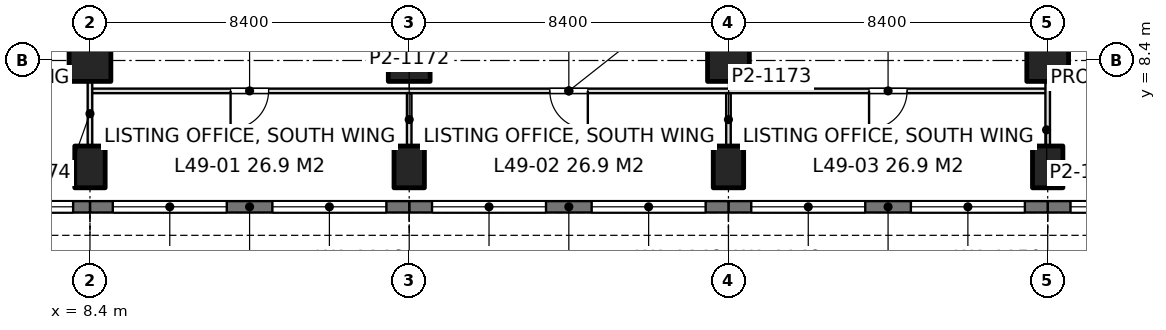
"""IFC4 building model, lengths in metres.
Left out: names, types, materials, properties, quantities, classifications, styles, units other than length and angle.
Written with IfcOpenShell. Run it as: python <this file> out.ifc"""

import sys

from ifc_helpers import new_model, si_unit, direction, frame, frame_2d, origin, origin_2d, place, context, subcontext, project, spatial, rectangle, extrude, element, fill, save


model = new_model("IFC4")
c1 = context("Model", 3, precision=1e-05, world=origin(), true_north=direction((0.0, 1.0)))
c2 = subcontext(c1, "Body", "Model", "MODEL_VIEW")
j1 = project(units=[si_unit("LENGTHUNIT", "METRE"), si_unit("PLANEANGLEUNIT", "RADIAN")], contexts=[c1])
p1 = place(None, origin())
s1 = spatial("IfcSite", under=j1, at=p1, CompositionType="ELEMENT")
p2 = place(p1, origin())
s2 = spatial("IfcBuilding", under=s1, at=p2, CompositionType="ELEMENT")
p3 = place(p2, frame((0.0, 0.0, 215.4)))
s3 = spatial("IfcBuildingStorey", under=s2, at=p3, CompositionType="ELEMENT", Elevation=215.4)
p4 = place(p3, frame((8.4, 5.6, 0.0), z_axis=(0.0, 0.0, 1.0), x_axis=(1.0, 0.0, 0.0)))
e1 = element("IfcColumn", 1, at=p4, inside=s3, PredefinedType="COLUMN", context=c2, shape_type="SweptSolid", body=[
    extrude(rectangle(XDim=0.8, YDim=1.1, at=origin_2d()), origin(), (0.0, 0.0, 1.0), 4.2),
])
p5 = place(p3, frame((8.4, 8.4, 0.0), z_axis=(0.0, 0.0, 1.0), x_axis=(1.0, 0.0, 0.0)))
e2 = element("IfcColumn", 2, at=p5, inside=s3, PredefinedType="COLUMN", context=c2, shape_type="SweptSolid", body=[
    extrude(rectangle(XDim=1.1, YDim=1.1, at=origin_2d()), origin(), (0.0, 0.0, 1.0), 4.2),
])
p6 = place(p3, frame((16.8, 5.6, 0.0), z_axis=(0.0, 0.0, 1.0), x_axis=(1.0, 0.0, 0.0)))
e3 = element("IfcColumn", 3, at=p6, inside=s3, PredefinedType="COLUMN", context=c2, shape_type="SweptSolid", body=[
    extrude(rectangle(XDim=0.8, YDim=1.1, at=origin_2d()), origin(), (0.0, 0.0, 1.0), 4.2),
])
p7 = place(p3, frame((16.8, 8.4, 0.0), z_axis=(0.0, 0.0, 1.0), x_axis=(1.0, 0.0, 0.0)))
e4 = element("IfcColumn", 4, at=p7, inside=s3, PredefinedType="COLUMN", context=c2, shape_type="SweptSolid", body=[
    extrude(rectangle(XDim=1.1, YDim=1.1, at=origin_2d()), origin(), (0.0, 0.0, 1.0), 4.2),
])
p8 = place(p3, frame((25.2, 5.6, 0.0), z_axis=(0.0, 0.0, 1.0), x_axis=(1.0, 0.0, 0.0)))
e5 = element("IfcColumn", 5, at=p8, inside=s3, PredefinedType="COLUMN", context=c2, shape_type="SweptSolid", body=[
    extrude(rectangle(XDim=0.8, YDim=1.1, at=origin_2d()), origin(), (0.0, 0.0, 1.0), 4.2),
])
p9 = place(p3, frame((25.2, 8.4, 0.0), z_axis=(0.0, 0.0, 1.0), x_axis=(1.0, 0.0, 0.0)))
e6 = element("IfcColumn", 6, at=p9, inside=s3, PredefinedType="COLUMN", context=c2, shape_type="SweptSolid", body=[
    extrude(rectangle(XDim=1.1, YDim=1.1, at=origin_2d()), origin(), (0.0, 0.0, 1.0), 4.2),
])
p10 = place(p3, frame((33.6, 5.6, 0.0), z_axis=(0.0, 0.0, 1.0), x_axis=(1.0, 0.0, 0.0)))
e7 = element("IfcColumn", 7, at=p10, inside=s3, PredefinedType="COLUMN", context=c2, shape_type="SweptSolid", body=[
    extrude(rectangle(XDim=0.8, YDim=1.1, at=origin_2d()), origin(), (0.0, 0.0, 1.0), 4.2),
])
p11 = place(p3, frame((33.6, 8.4, 0.0), z_axis=(0.0, 0.0, 1.0), x_axis=(1.0, 0.0, 0.0)))
e8 = element("IfcColumn", 8, at=p11, inside=s3, PredefinedType="COLUMN", context=c2, shape_type="SweptSolid", body=[
    extrude(rectangle(XDim=1.1, YDim=1.1, at=origin_2d()), origin(), (0.0, 0.0, 1.0), 4.2),
])
p12 = place(p3, frame((42.0, 4.55, 0.0), z_axis=(0.0, 0.0, 1.0), x_axis=(-1.0, 0.0, 0.0)))
e9 = element("IfcWall", 9, at=p12, inside=s3, PredefinedType="SOLIDWALL", context=c2, shape_type="SweptSolid", body=[
    extrude(rectangle(XDim=8.4, YDim=0.3, at=frame_2d((4.2, 0.0))), origin(), (0.0, 0.0, 1.0), 4.05),
])
p13 = place(p12, frame((0.6, 0.0, 0.9)))
e10 = element("IfcOpeningElement", 10, at=p13, cuts=e9, PredefinedType="OPENING", context=c2, shape_type="SweptSolid", body=[
    extrude(rectangle(XDim=3.0, YDim=1.9, at=frame_2d((1.5, 0.95))), frame((0.0, 0.16, 0.0), z_axis=(0.0, -1.0, 0.0), x_axis=(1.0, 0.0, 0.0)), (0.0, 0.0, 1.0), 0.32),
])
p14 = place(p12, frame((4.8, 0.0, 0.9)))
e11 = element("IfcOpeningElement", 11, at=p14, cuts=e9, PredefinedType="OPENING", context=c2, shape_type="SweptSolid", body=[
    extrude(rectangle(XDim=3.0, YDim=1.9, at=frame_2d((1.5, 0.95))), frame((0.0, 0.16, 0.0), z_axis=(0.0, -1.0, 0.0), x_axis=(1.0, 0.0, 0.0)), (0.0, 0.0, 1.0), 0.32),
])
p15 = place(p3, frame((33.6, 4.55, 0.0), z_axis=(0.0, 0.0, 1.0), x_axis=(-1.0, 0.0, 0.0)))
e12 = element("IfcWall", 12, at=p15, inside=s3, PredefinedType="SOLIDWALL", context=c2, shape_type="SweptSolid", body=[
    extrude(rectangle(XDim=8.4, YDim=0.3, at=frame_2d((4.2, 0.0))), origin(), (0.0, 0.0, 1.0), 4.05),
])
p16 = place(p15, frame((0.6, 0.0, 0.9)))
e13 = element("IfcOpeningElement", 13, at=p16, cuts=e12, PredefinedType="OPENING", context=c2, shape_type="SweptSolid", body=[
    extrude(rectangle(XDim=3.0, YDim=1.9, at=frame_2d((1.5, 0.95))), frame((0.0, 0.16, 0.0), z_axis=(0.0, -1.0, 0.0), x_axis=(1.0, 0.0, 0.0)), (0.0, 0.0, 1.0), 0.32),
])
p17 = place(p15, frame((4.8, 0.0, 0.9)))
e14 = element("IfcOpeningElement", 14, at=p17, cuts=e12, PredefinedType="OPENING", context=c2, shape_type="SweptSolid", body=[
    extrude(rectangle(XDim=3.0, YDim=1.9, at=frame_2d((1.5, 0.95))), frame((0.0, 0.16, 0.0), z_axis=(0.0, -1.0, 0.0), x_axis=(1.0, 0.0, 0.0)), (0.0, 0.0, 1.0), 0.32),
])
p18 = place(p3, frame((25.2, 4.55, 0.0), z_axis=(0.0, 0.0, 1.0), x_axis=(-1.0, 0.0, 0.0)))
e15 = element("IfcWall", 15, at=p18, inside=s3, PredefinedType="SOLIDWALL", context=c2, shape_type="SweptSolid", body=[
    extrude(rectangle(XDim=8.4, YDim=0.3, at=frame_2d((4.2, 0.0))), origin(), (0.0, 0.0, 1.0), 4.05),
])
p19 = place(p18, frame((0.6, 0.0, 0.9)))
e16 = element("IfcOpeningElement", 16, at=p19, cuts=e15, PredefinedType="OPENING", context=c2, shape_type="SweptSolid", body=[
    extrude(rectangle(XDim=3.0, YDim=1.9, at=frame_2d((1.5, 0.95))), frame((0.0, 0.16, 0.0), z_axis=(0.0, -1.0, 0.0), x_axis=(1.0, 0.0, 0.0)), (0.0, 0.0, 1.0), 0.32),
])
p20 = place(p18, frame((4.8, 0.0, 0.9)))
e17 = element("IfcOpeningElement", 17, at=p20, cuts=e15, PredefinedType="OPENING", context=c2, shape_type="SweptSolid", body=[
    extrude(rectangle(XDim=3.0, YDim=1.9, at=frame_2d((1.5, 0.95))), frame((0.0, 0.16, 0.0), z_axis=(0.0, -1.0, 0.0), x_axis=(1.0, 0.0, 0.0)), (0.0, 0.0, 1.0), 0.32),
])
p21 = place(p3, frame((16.8, 4.55, 0.0), z_axis=(0.0, 0.0, 1.0), x_axis=(-1.0, 0.0, 0.0)))
e18 = element("IfcWall", 18, at=p21, inside=s3, PredefinedType="SOLIDWALL", context=c2, shape_type="SweptSolid", body=[
    extrude(rectangle(XDim=8.4, YDim=0.3, at=frame_2d((4.2, 0.0))), origin(), (0.0, 0.0, 1.0), 4.05),
])
p22 = place(p21, frame((0.6, 0.0, 0.9)))
e19 = element("IfcOpeningElement", 19, at=p22, cuts=e18, PredefinedType="OPENING", context=c2, shape_type="SweptSolid", body=[
    extrude(rectangle(XDim=3.0, YDim=1.9, at=frame_2d((1.5, 0.95))), frame((0.0, 0.16, 0.0), z_axis=(0.0, -1.0, 0.0), x_axis=(1.0, 0.0, 0.0)), (0.0, 0.0, 1.0), 0.32),
])
p23 = place(p21, frame((4.8, 0.0, 0.9)))
e20 = element("IfcOpeningElement", 20, at=p23, cuts=e18, PredefinedType="OPENING", context=c2, shape_type="SweptSolid", body=[
    extrude(rectangle(XDim=3.0, YDim=1.9, at=frame_2d((1.5, 0.95))), frame((0.0, 0.16, 0.0), z_axis=(0.0, -1.0, 0.0), x_axis=(1.0, 0.0, 0.0)), (0.0, 0.0, 1.0), 0.32),
])
p24 = place(p3, frame((8.4, 4.55, 0.0), z_axis=(0.0, 0.0, 1.0), x_axis=(-1.0, 0.0, 0.0)))
e21 = element("IfcWall", 21, at=p24, inside=s3, PredefinedType="SOLIDWALL", context=c2, shape_type="SweptSolid", body=[
    extrude(rectangle(XDim=8.085, YDim=0.3, at=frame_2d((4.042, 0.0))), origin(), (0.0, 0.0, 1.0), 4.05),
])
p25 = place(p24, frame((0.443, 0.0, 0.9)))
e22 = element("IfcOpeningElement", 22, at=p25, cuts=e21, PredefinedType="OPENING", context=c2, shape_type="SweptSolid", body=[
    extrude(rectangle(XDim=3.0, YDim=1.9, at=frame_2d((1.5, 0.95))), frame((0.0, 0.16, 0.0), z_axis=(0.0, -1.0, 0.0), x_axis=(1.0, 0.0, 0.0)), (0.0, 0.0, 1.0), 0.32),
])
p26 = place(p24, frame((4.643, 0.0, 0.9)))
e23 = element("IfcOpeningElement", 23, at=p26, cuts=e21, PredefinedType="OPENING", context=c2, shape_type="SweptSolid", body=[
    extrude(rectangle(XDim=3.0, YDim=1.9, at=frame_2d((1.5, 0.95))), frame((0.0, 0.16, 0.0), z_axis=(0.0, -1.0, 0.0), x_axis=(1.0, 0.0, 0.0)), (0.0, 0.0, 1.0), 0.32),
])
p27 = place(p3, frame((8.4, 7.6, 0.0), z_axis=(0.0, 0.0, 1.0), x_axis=(1.0, 0.0, 0.0)))
e24 = element("IfcWall", 24, at=p27, inside=s3, PredefinedType="PARTITIONING", context=c2, shape_type="SweptSolid", body=[
    extrude(rectangle(XDim=25.2, YDim=0.12, at=frame_2d((12.6, 0.0))), origin(), (0.0, 0.0, 1.0), 3.69),
])
p28 = place(p27, frame((3.7, 0.0, 0.0)))
e25 = element("IfcOpeningElement", 25, at=p28, cuts=e24, PredefinedType="OPENING", context=c2, shape_type="SweptSolid", body=[
    extrude(rectangle(XDim=1.0, YDim=2.4, at=frame_2d((0.5, 1.2))), frame((0.0, 0.07, 0.0), z_axis=(0.0, -1.0, 0.0), x_axis=(1.0, 0.0, 0.0)), (0.0, 0.0, 1.0), 0.14),
])
p29 = place(p27, frame((12.1, 0.0, 0.0)))
e26 = element("IfcOpeningElement", 26, at=p29, cuts=e24, PredefinedType="OPENING", context=c2, shape_type="SweptSolid", body=[
    extrude(rectangle(XDim=1.0, YDim=2.4, at=frame_2d((0.5, 1.2))), frame((0.0, 0.07, 0.0), z_axis=(0.0, -1.0, 0.0), x_axis=(1.0, 0.0, 0.0)), (0.0, 0.0, 1.0), 0.14),
])
p30 = place(p27, frame((20.5, 0.0, 0.0)))
e27 = element("IfcOpeningElement", 27, at=p30, cuts=e24, PredefinedType="OPENING", context=c2, shape_type="SweptSolid", body=[
    extrude(rectangle(XDim=1.0, YDim=2.4, at=frame_2d((0.5, 1.2))), frame((0.0, 0.07, 0.0), z_axis=(0.0, -1.0, 0.0), x_axis=(1.0, 0.0, 0.0)), (0.0, 0.0, 1.0), 0.14),
])
p31 = place(p3, frame((8.4, 6.149, 0.0), z_axis=(0.0, 0.0, 1.0), x_axis=(0.0, 1.0, 0.0)))
e28 = element("IfcWall", 28, at=p31, inside=s3, PredefinedType="PARTITIONING", context=c2, shape_type="SweptSolid", body=[
    extrude(rectangle(XDim=1.703, YDim=0.12, at=frame_2d((0.852, 0.0))), origin(), (0.0, 0.0, 1.0), 3.69),
])
for number, where, z_axis, x_axis in (
    (29, (16.8, 6.149, 0.0), (0.0, 0.0, 1.0), (0.0, 1.0, 0.0)),
    (30, (25.2, 6.149, 0.0), (0.0, 0.0, 1.0), (0.0, 1.0, 0.0)),
):
    element("IfcWall", number, at=place(p3, frame(where, z_axis=z_axis, x_axis=x_axis)), inside=s3, PredefinedType="PARTITIONING", context=c2, shape_type="SweptSolid", body=[
        extrude(rectangle(XDim=1.393, YDim=0.12, at=frame_2d((0.697, 0.0))), origin(), (0.0, 0.0, 1.0), 3.69),
    ])
p32 = place(p3, frame((33.6, 6.149, 0.0), z_axis=(0.0, 0.0, 1.0), x_axis=(0.0, 1.0, 0.0)))
e31 = element("IfcWall", 31, at=p32, inside=s3, PredefinedType="PARTITIONING", context=c2, shape_type="SweptSolid", body=[
    extrude(rectangle(XDim=1.703, YDim=0.12, at=frame_2d((0.852, 0.0))), origin(), (0.0, 0.0, 1.0), 3.69),
])
p33 = place(p14, origin())
e32 = element("IfcWindow", 32, at=p33, inside=s3, PartitioningType="SINGLE_PANEL", PredefinedType="WINDOW", context=c2, shape_type="SweptSolid", body=[
    extrude(rectangle(XDim=3.0, YDim=1.9, at=frame_2d((1.5, 0.95))), frame((0.0, 0.03, 0.0), z_axis=(0.0, -1.0, 0.0), x_axis=(1.0, 0.0, 0.0)), (0.0, 0.0, 1.0), 0.06),
])
fill(e11, e32)
p34 = place(p16, origin())
e33 = element("IfcWindow", 33, at=p34, inside=s3, PartitioningType="SINGLE_PANEL", PredefinedType="WINDOW", context=c2, shape_type="SweptSolid", body=[
    extrude(rectangle(XDim=3.0, YDim=1.9, at=frame_2d((1.5, 0.95))), frame((0.0, 0.03, 0.0), z_axis=(0.0, -1.0, 0.0), x_axis=(1.0, 0.0, 0.0)), (0.0, 0.0, 1.0), 0.06),
])
fill(e13, e33)
p35 = place(p17, origin())
e34 = element("IfcWindow", 34, at=p35, inside=s3, PartitioningType="SINGLE_PANEL", PredefinedType="WINDOW", context=c2, shape_type="SweptSolid", body=[
    extrude(rectangle(XDim=3.0, YDim=1.9, at=frame_2d((1.5, 0.95))), frame((0.0, 0.03, 0.0), z_axis=(0.0, -1.0, 0.0), x_axis=(1.0, 0.0, 0.0)), (0.0, 0.0, 1.0), 0.06),
])
fill(e14, e34)
p36 = place(p19, origin())
e35 = element("IfcWindow", 35, at=p36, inside=s3, PartitioningType="SINGLE_PANEL", PredefinedType="WINDOW", context=c2, shape_type="SweptSolid", body=[
    extrude(rectangle(XDim=3.0, YDim=1.9, at=frame_2d((1.5, 0.95))), frame((0.0, 0.03, 0.0), z_axis=(0.0, -1.0, 0.0), x_axis=(1.0, 0.0, 0.0)), (0.0, 0.0, 1.0), 0.06),
])
fill(e16, e35)
p37 = place(p20, origin())
e36 = element("IfcWindow", 36, at=p37, inside=s3, PartitioningType="SINGLE_PANEL", PredefinedType="WINDOW", context=c2, shape_type="SweptSolid", body=[
    extrude(rectangle(XDim=3.0, YDim=1.9, at=frame_2d((1.5, 0.95))), frame((0.0, 0.03, 0.0), z_axis=(0.0, -1.0, 0.0), x_axis=(1.0, 0.0, 0.0)), (0.0, 0.0, 1.0), 0.06),
])
fill(e17, e36)
p38 = place(p22, origin())
e37 = element("IfcWindow", 37, at=p38, inside=s3, PartitioningType="SINGLE_PANEL", PredefinedType="WINDOW", context=c2, shape_type="SweptSolid", body=[
    extrude(rectangle(XDim=3.0, YDim=1.9, at=frame_2d((1.5, 0.95))), frame((0.0, 0.03, 0.0), z_axis=(0.0, -1.0, 0.0), x_axis=(1.0, 0.0, 0.0)), (0.0, 0.0, 1.0), 0.06),
])
fill(e19, e37)
p39 = place(p23, origin())
e38 = element("IfcWindow", 38, at=p39, inside=s3, PartitioningType="SINGLE_PANEL", PredefinedType="WINDOW", context=c2, shape_type="SweptSolid", body=[
    extrude(rectangle(XDim=3.0, YDim=1.9, at=frame_2d((1.5, 0.95))), frame((0.0, 0.03, 0.0), z_axis=(0.0, -1.0, 0.0), x_axis=(1.0, 0.0, 0.0)), (0.0, 0.0, 1.0), 0.06),
])
fill(e20, e38)
p40 = place(p25, origin())
e39 = element("IfcWindow", 39, at=p40, inside=s3, PartitioningType="SINGLE_PANEL", PredefinedType="WINDOW", context=c2, shape_type="SweptSolid", body=[
    extrude(rectangle(XDim=3.0, YDim=1.9, at=frame_2d((1.5, 0.95))), frame((0.0, 0.03, 0.0), z_axis=(0.0, -1.0, 0.0), x_axis=(1.0, 0.0, 0.0)), (0.0, 0.0, 1.0), 0.06),
])
fill(e22, e39)
p41 = place(p28, frame((1.0, 0.0, 0.0), z_axis=(0.0, 0.0, 1.0), x_axis=(-1.0, 0.0, 0.0)))
e40 = element("IfcDoor", 40, at=p41, inside=s3, OperationType="SINGLE_SWING_RIGHT", PredefinedType="DOOR", context=c2, shape_type="SweptSolid", body=[
    extrude(rectangle(XDim=1.0, YDim=2.4, at=frame_2d((0.5, 1.2))), frame((0.0, 0.025, 0.0), z_axis=(0.0, -1.0, 0.0), x_axis=(1.0, 0.0, 0.0)), (0.0, 0.0, 1.0), 0.05),
])
fill(e25, e40)
p42 = place(p29, frame((1.0, 0.0, 0.0), z_axis=(0.0, 0.0, 1.0), x_axis=(-1.0, 0.0, 0.0)))
e41 = element("IfcDoor", 41, at=p42, inside=s3, OperationType="SINGLE_SWING_LEFT", PredefinedType="DOOR", context=c2, shape_type="SweptSolid", body=[
    extrude(rectangle(XDim=1.0, YDim=2.4, at=frame_2d((0.5, 1.2))), frame((0.0, 0.025, 0.0), z_axis=(0.0, -1.0, 0.0), x_axis=(1.0, 0.0, 0.0)), (0.0, 0.0, 1.0), 0.05),
])
fill(e26, e41)
p43 = place(p30, frame((1.0, 0.0, 0.0), z_axis=(0.0, 0.0, 1.0), x_axis=(-1.0, 0.0, 0.0)))
e42 = element("IfcDoor", 42, at=p43, inside=s3, OperationType="SINGLE_SWING_RIGHT", PredefinedType="DOOR", context=c2, shape_type="SweptSolid", body=[
    extrude(rectangle(XDim=1.0, YDim=2.4, at=frame_2d((0.5, 1.2))), frame((0.0, 0.025, 0.0), z_axis=(0.0, -1.0, 0.0), x_axis=(1.0, 0.0, 0.0)), (0.0, 0.0, 1.0), 0.05),
])
fill(e27, e42)
save(model, sys.argv[1])
